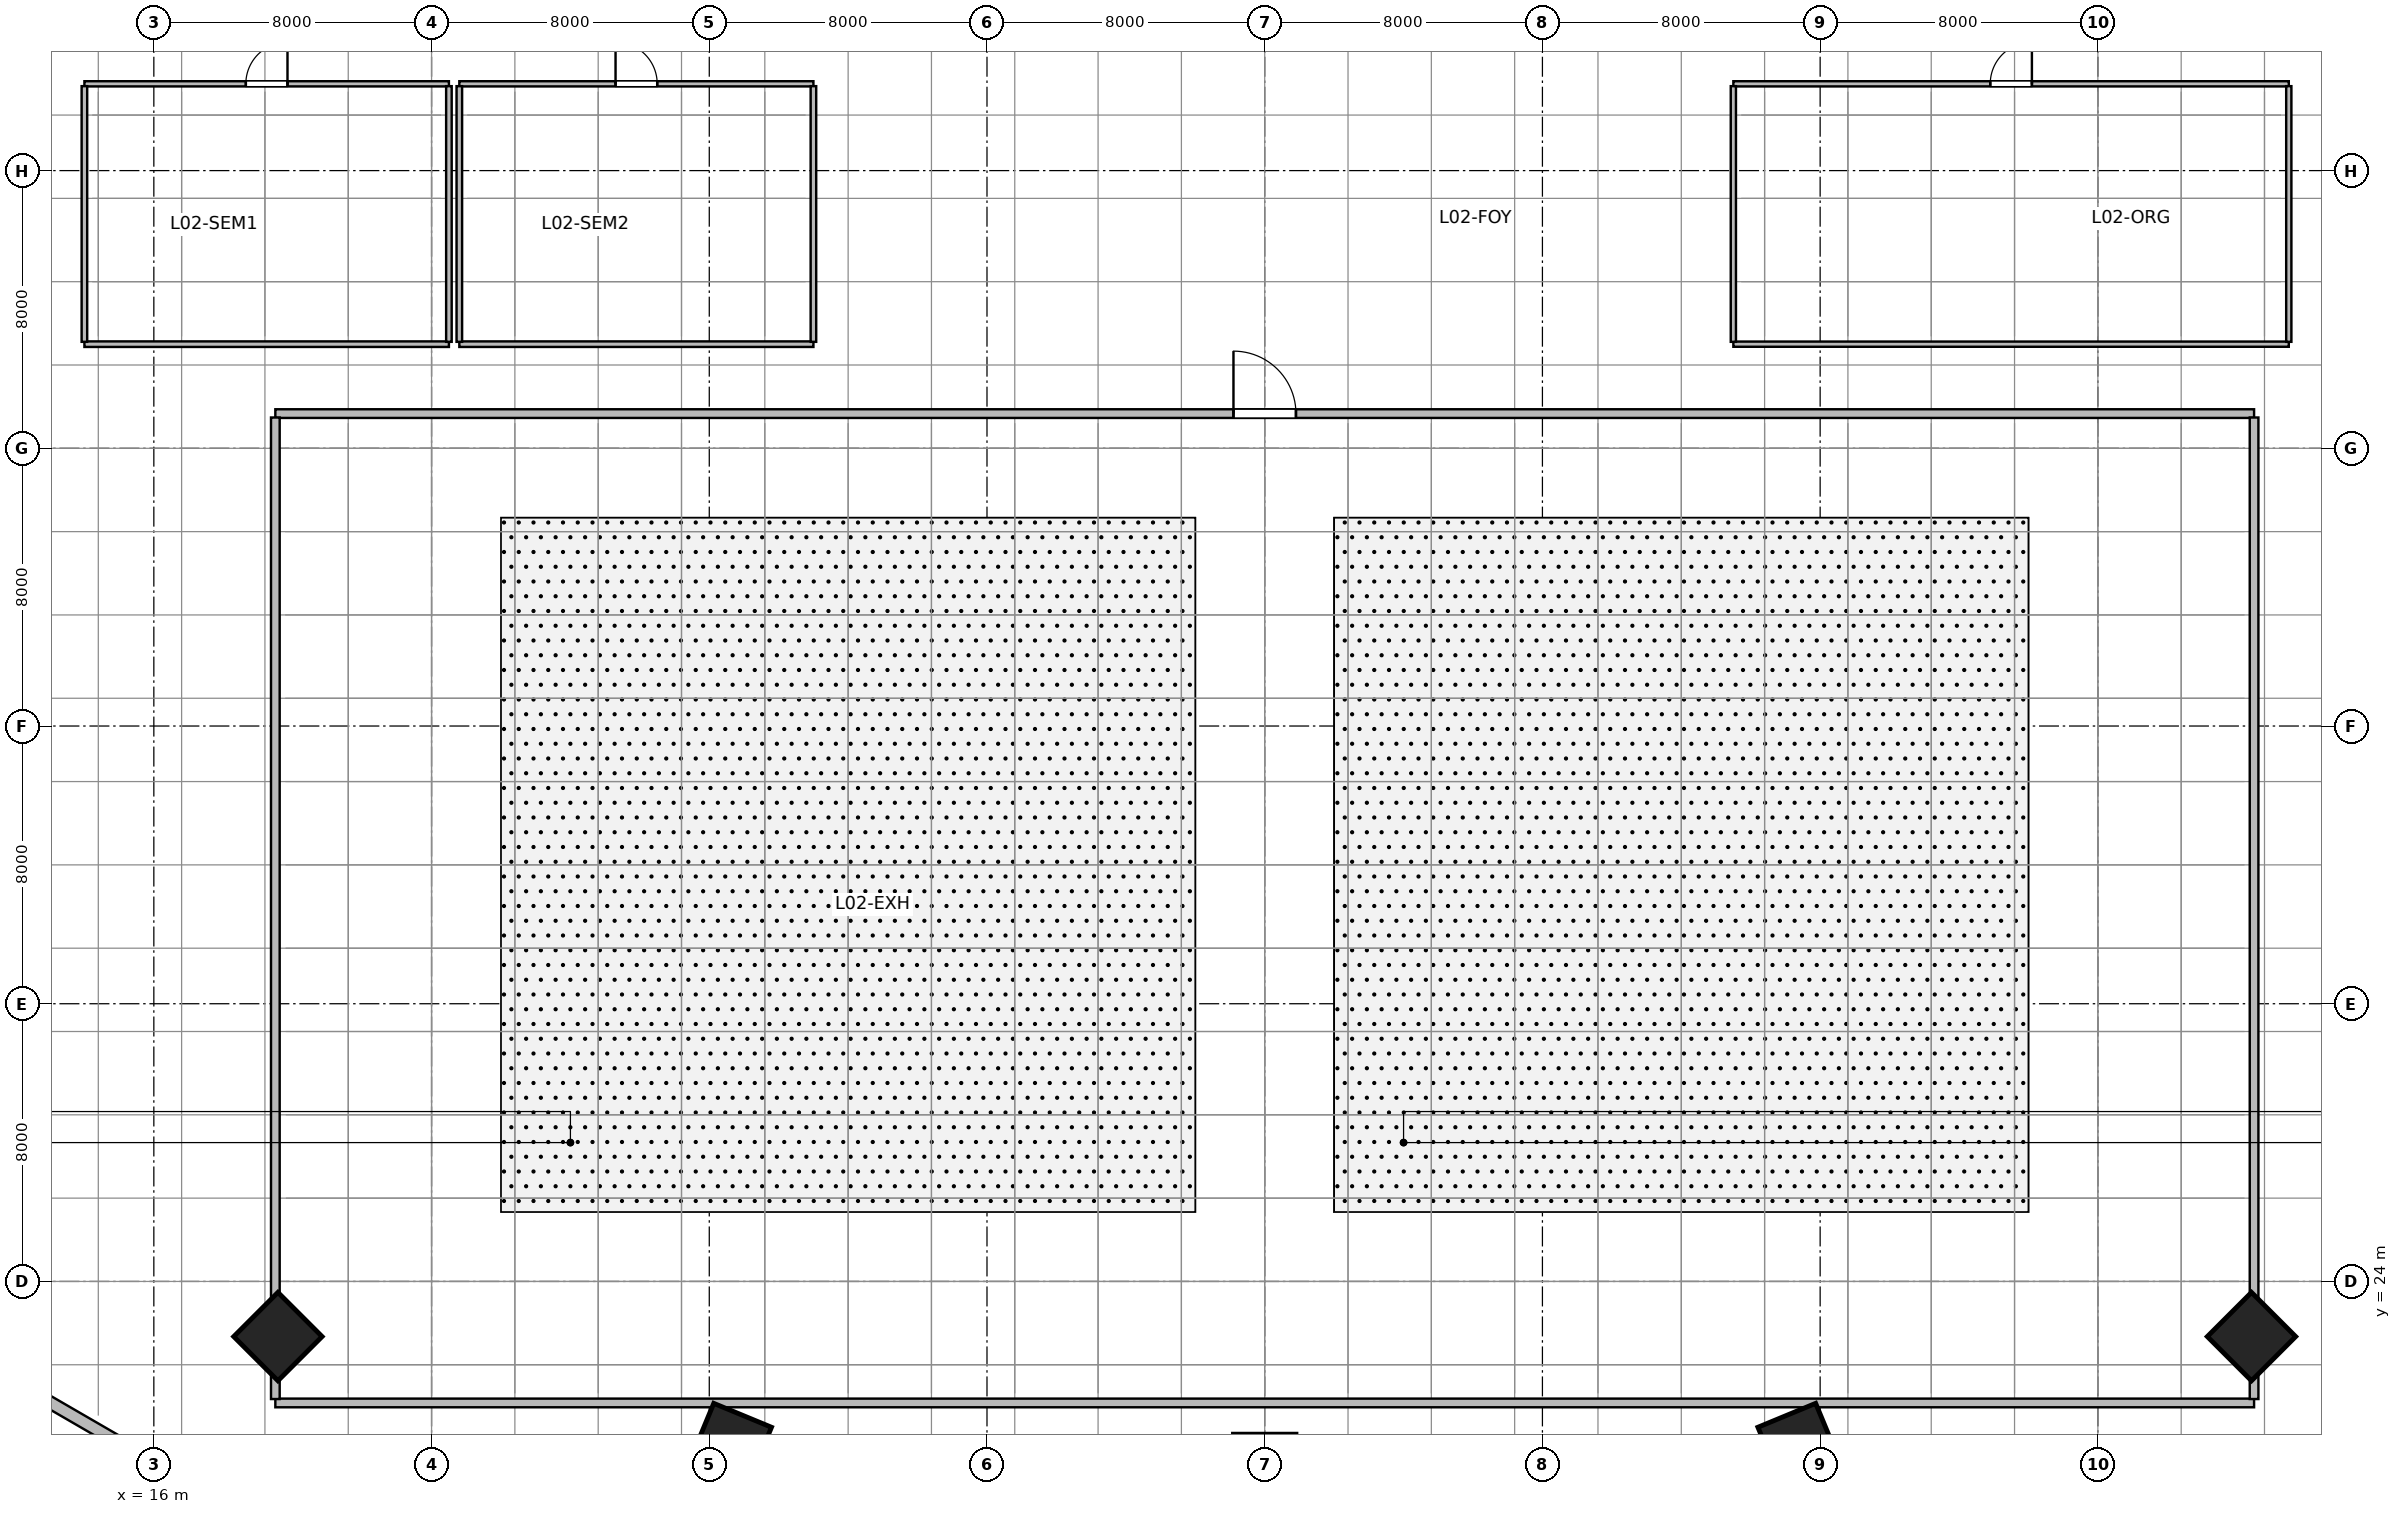
"""IFC4 building model, lengths in metres.
Left out: names, types, materials, properties, quantities, classifications, styles, units other than length and angle.
Written with IfcOpenShell. Run it as: python <this file> out.ifc"""

import sys

from ifc_helpers import new_model, si_unit, direction, frame, frame_2d, origin, origin_2d, place, context, subcontext, project, spatial, rectangle, extrude, source, transform, mapped, element, fill, save


model = new_model("IFC4")
c1 = context("Model", 3, precision=1e-05, world=origin(), true_north=direction((0.0, 1.0)))
c2 = subcontext(c1, "Body", "Model", "MODEL_VIEW")
j1 = project(units=[si_unit("LENGTHUNIT", "METRE"), si_unit("PLANEANGLEUNIT", "RADIAN")], contexts=[c1])
p1 = place(None, origin())
s1 = spatial("IfcSite", under=j1, at=p1, CompositionType="ELEMENT")
p2 = place(p1, origin())
s2 = spatial("IfcBuilding", under=s1, at=p2, CompositionType="ELEMENT")
p3 = place(p2, frame((0.0, 0.0, 12.0)))
s3 = spatial("IfcBuildingStorey", under=s2, at=p3, CompositionType="ELEMENT", Elevation=12.0)
m1 = source(origin(), c2, "Body", "SweptSolid", [
    extrude(rectangle(XDim=1.8, YDim=1.8, at=origin_2d()), origin(), (0.0, 0.0, 1.0), 6.0),
])
for number, where, z_axis, x_axis in (
    (1, (19.574, 22.412, 0.0), (0.0, 0.0, 1.0), (-0.707, -0.707, 0.0)),
    (2, (32.616, 19.312, 0.0), (0.0, 0.0, 1.0), (-0.383, -0.924, 0.0)),
    (3, (63.384, 19.312, 0.0), (0.0, 0.0, 1.0), (0.383, -0.924, 0.0)),
    (4, (76.426, 22.412, 0.0), (0.0, 0.0, 1.0), (0.707, -0.707, 0.0)),
):
    element("IfcColumn", number, at=place(p3, frame(where, z_axis=z_axis, x_axis=x_axis)), inside=s3, PredefinedType="COLUMN", context=c2, shape_type="MappedRepresentation", body=[
        mapped(m1, transform((0.0, 0.0, 0.0), scale=1.0)),
    ])
m2 = source(origin(), c2, "Body", "SweptSolid", [
    extrude(rectangle(XDim=4.535, YDim=0.35, at=frame_2d((2.268, 0.0))), origin(), (0.0, 0.0, 1.0), 5.7),
])
p4 = place(p3, frame((11.902, 21.154, 0.0), z_axis=(0.0, 0.0, 1.0), x_axis=(0.86528620064, -0.501278157295, 0.0)))
e5 = element("IfcWall", 5, at=p4, inside=s3, PredefinedType="SOLIDWALL", context=c2, shape_type="MappedRepresentation", body=[
    mapped(m2, transform((0.0, 0.0, 0.0), scale=1.0)),
])
m3 = source(origin(), c2, "Body", "SweptSolid", [
    extrude(rectangle(XDim=57.0, YDim=0.25, at=frame_2d((28.5, 0.0))), origin(), (0.0, 0.0, 1.0), 4.761),
])
p5 = place(p3, frame((19.5, 20.5, 0.0), z_axis=(0.0, 0.0, 1.0), x_axis=(1.0, 0.0, 0.0)))
e6 = element("IfcWall", 6, at=p5, inside=s3, PredefinedType="PARTITIONING", context=c2, shape_type="MappedRepresentation", body=[
    mapped(m3, transform((0.0, 0.0, 0.0), scale=1.0)),
])
m4 = source(origin(), c2, "Body", "SweptSolid", [
    extrude(rectangle(XDim=57.0, YDim=0.25, at=frame_2d((28.5, 0.0))), origin(), (0.0, 0.0, 1.0), 5.7),
])
p6 = place(p3, frame((19.5, 49.0, 0.0), z_axis=(0.0, 0.0, 1.0), x_axis=(1.0, 0.0, 0.0)))
e7 = element("IfcWall", 7, at=p6, inside=s3, PredefinedType="PARTITIONING", context=c2, shape_type="MappedRepresentation", body=[
    mapped(m4, transform((0.0, 0.0, 0.0), scale=1.0)),
])
p7 = place(p6, frame((27.6, 0.0, 0.0)))
e8 = element("IfcOpeningElement", 8, at=p7, cuts=e7, PredefinedType="OPENING", context=c2, shape_type="SweptSolid", body=[
    extrude(rectangle(XDim=1.8, YDim=2.15, at=frame_2d((0.9, 1.075))), frame((0.0, 0.135, 0.0), z_axis=(0.0, -1.0, 0.0), x_axis=(1.0, 0.0, 0.0)), (0.0, 0.0, 1.0), 0.27),
])
m5 = source(origin(), c2, "Body", "SweptSolid", [
    extrude(rectangle(XDim=28.275, YDim=0.25, at=frame_2d((14.137, 0.0))), origin(), (0.0, 0.0, 1.0), 5.7),
])
for number, where, z_axis, x_axis in (
    (9, (19.5, 20.613, 0.0), (0.0, 0.0, 1.0), (0.0, 1.0, 0.0)),
    (10, (76.5, 20.613, 0.0), (0.0, 0.0, 1.0), (0.0, 1.0, 0.0)),
):
    element("IfcWall", number, at=place(p3, frame(where, z_axis=z_axis, x_axis=x_axis)), inside=s3, PredefinedType="PARTITIONING", context=c2, shape_type="MappedRepresentation", body=[
        mapped(m5, transform((0.0, 0.0, 0.0), scale=1.0)),
    ])
m6 = source(origin(), c2, "Body", "SweptSolid", [
    extrude(rectangle(XDim=10.5, YDim=0.16, at=frame_2d((5.25, 0.0))), origin(), (0.0, 0.0, 1.0), 5.7),
])
p8 = place(p3, frame((14.0, 51.0, 0.0), z_axis=(0.0, 0.0, 1.0), x_axis=(1.0, 0.0, 0.0)))
e11 = element("IfcWall", 11, at=p8, inside=s3, PredefinedType="MOVABLE", context=c2, shape_type="MappedRepresentation", body=[
    mapped(m6, transform((0.0, 0.0, 0.0), scale=1.0)),
])
m7 = source(origin(), c2, "Body", "SweptSolid", [
    extrude(rectangle(XDim=10.5, YDim=0.15, at=frame_2d((5.25, 0.0))), origin(), (0.0, 0.0, 1.0), 5.7),
])
p9 = place(p3, frame((14.0, 58.5, 0.0), z_axis=(0.0, 0.0, 1.0), x_axis=(1.0, 0.0, 0.0)))
e12 = element("IfcWall", 12, at=p9, inside=s3, PredefinedType="PARTITIONING", context=c2, shape_type="MappedRepresentation", body=[
    mapped(m7, transform((0.0, 0.0, 0.0), scale=1.0)),
])
p10 = place(p9, frame((4.65, 0.0, 0.0)))
e13 = element("IfcOpeningElement", 13, at=p10, cuts=e12, PredefinedType="OPENING", context=c2, shape_type="SweptSolid", body=[
    extrude(rectangle(XDim=1.2, YDim=2.15, at=frame_2d((0.6, 1.075))), frame((0.0, 0.085, 0.0), z_axis=(0.0, -1.0, 0.0), x_axis=(1.0, 0.0, 0.0)), (0.0, 0.0, 1.0), 0.17),
])
m8 = source(origin(), c2, "Body", "SweptSolid", [
    extrude(rectangle(XDim=7.365, YDim=0.16, at=frame_2d((3.683, 0.0))), origin(), (0.0, 0.0, 1.0), 5.7),
])
for number, where, z_axis, x_axis in (
    (14, (14.0, 51.067, 0.0), (0.0, 0.0, 1.0), (0.0, 1.0, 0.0)),
    (15, (24.5, 51.067, 0.0), (0.0, 0.0, 1.0), (0.0, 1.0, 0.0)),
):
    element("IfcWall", number, at=place(p3, frame(where, z_axis=z_axis, x_axis=x_axis)), inside=s3, PredefinedType="MOVABLE", context=c2, shape_type="MappedRepresentation", body=[
        mapped(m8, transform((0.0, 0.0, 0.0), scale=1.0)),
    ])
m9 = source(origin(), c2, "Body", "SweptSolid", [
    extrude(rectangle(XDim=10.2, YDim=0.16, at=frame_2d((5.1, 0.0))), origin(), (0.0, 0.0, 1.0), 5.7),
])
p11 = place(p3, frame((24.8, 51.0, 0.0), z_axis=(0.0, 0.0, 1.0), x_axis=(1.0, 0.0, 0.0)))
e16 = element("IfcWall", 16, at=p11, inside=s3, PredefinedType="MOVABLE", context=c2, shape_type="MappedRepresentation", body=[
    mapped(m9, transform((0.0, 0.0, 0.0), scale=1.0)),
])
m10 = source(origin(), c2, "Body", "SweptSolid", [
    extrude(rectangle(XDim=10.2, YDim=0.15, at=frame_2d((5.1, 0.0))), origin(), (0.0, 0.0, 1.0), 4.834),
])
p12 = place(p3, frame((24.8, 58.5, 0.0), z_axis=(0.0, 0.0, 1.0), x_axis=(1.0, 0.0, 0.0)))
e17 = element("IfcWall", 17, at=p12, inside=s3, PredefinedType="PARTITIONING", context=c2, shape_type="MappedRepresentation", body=[
    mapped(m10, transform((0.0, 0.0, 0.0), scale=1.0)),
])
p13 = place(p12, frame((4.5, 0.0, 0.0)))
e18 = element("IfcOpeningElement", 18, at=p13, cuts=e17, PredefinedType="OPENING", context=c2, shape_type="SweptSolid", body=[
    extrude(rectangle(XDim=1.2, YDim=2.15, at=frame_2d((0.6, 1.075))), frame((0.0, 0.085, 0.0), z_axis=(0.0, -1.0, 0.0), x_axis=(1.0, 0.0, 0.0)), (0.0, 0.0, 1.0), 0.17),
])
p14 = place(p3, frame((24.8, 51.067, 0.0), z_axis=(0.0, 0.0, 1.0), x_axis=(0.0, 1.0, 0.0)))
e19 = element("IfcWall", 19, at=p14, inside=s3, PredefinedType="MOVABLE", context=c2, shape_type="MappedRepresentation", body=[
    mapped(m8, transform((0.0, 0.0, 0.0), scale=1.0)),
])
m11 = source(origin(), c2, "Body", "SweptSolid", [
    extrude(rectangle(XDim=7.365, YDim=0.16, at=frame_2d((3.683, 0.0))), origin(), (0.0, 0.0, 1.0), 4.834),
])
p15 = place(p3, frame((35.0, 51.067, 0.0), z_axis=(0.0, 0.0, 1.0), x_axis=(0.0, 1.0, 0.0)))
e20 = element("IfcWall", 20, at=p15, inside=s3, PredefinedType="MOVABLE", context=c2, shape_type="MappedRepresentation", body=[
    mapped(m11, transform((0.0, 0.0, 0.0), scale=1.0)),
])
m12 = source(origin(), c2, "Body", "SweptSolid", [
    extrude(rectangle(XDim=16.0, YDim=0.15, at=frame_2d((8.0, 0.0))), origin(), (0.0, 0.0, 1.0), 5.7),
])
p16 = place(p3, frame((61.5, 51.0, 0.0), z_axis=(0.0, 0.0, 1.0), x_axis=(1.0, 0.0, 0.0)))
e21 = element("IfcWall", 21, at=p16, inside=s3, PredefinedType="PARTITIONING", context=c2, shape_type="MappedRepresentation", body=[
    mapped(m12, transform((0.0, 0.0, 0.0), scale=1.0)),
])
m13 = source(origin(), c2, "Body", "SweptSolid", [
    extrude(rectangle(XDim=16.0, YDim=0.15, at=frame_2d((8.0, 0.0))), origin(), (0.0, 0.0, 1.0), 4.834),
])
p17 = place(p3, frame((61.5, 58.5, 0.0), z_axis=(0.0, 0.0, 1.0), x_axis=(1.0, 0.0, 0.0)))
e22 = element("IfcWall", 22, at=p17, inside=s3, PredefinedType="PARTITIONING", context=c2, shape_type="MappedRepresentation", body=[
    mapped(m13, transform((0.0, 0.0, 0.0), scale=1.0)),
])
p18 = place(p17, frame((7.4, 0.0, 0.0)))
e23 = element("IfcOpeningElement", 23, at=p18, cuts=e22, PredefinedType="OPENING", context=c2, shape_type="SweptSolid", body=[
    extrude(rectangle(XDim=1.2, YDim=2.15, at=frame_2d((0.6, 1.075))), frame((0.0, 0.085, 0.0), z_axis=(0.0, -1.0, 0.0), x_axis=(1.0, 0.0, 0.0)), (0.0, 0.0, 1.0), 0.17),
])
m14 = source(origin(), c2, "Body", "SweptSolid", [
    extrude(rectangle(XDim=7.365, YDim=0.15, at=frame_2d((3.683, 0.0))), origin(), (0.0, 0.0, 1.0), 4.834),
])
p19 = place(p3, frame((61.5, 51.067, 0.0), z_axis=(0.0, 0.0, 1.0), x_axis=(0.0, 1.0, 0.0)))
e24 = element("IfcWall", 24, at=p19, inside=s3, PredefinedType="PARTITIONING", context=c2, shape_type="MappedRepresentation", body=[
    mapped(m14, transform((0.0, 0.0, 0.0), scale=1.0)),
])
m15 = source(origin(), c2, "Body", "SweptSolid", [
    extrude(rectangle(XDim=7.365, YDim=0.15, at=frame_2d((3.683, 0.0))), origin(), (0.0, 0.0, 1.0), 5.7),
])
p20 = place(p3, frame((77.5, 51.067, 0.0), z_axis=(0.0, 0.0, 1.0), x_axis=(0.0, 1.0, 0.0)))
e25 = element("IfcWall", 25, at=p20, inside=s3, PredefinedType="PARTITIONING", context=c2, shape_type="MappedRepresentation", body=[
    mapped(m15, transform((0.0, 0.0, 0.0), scale=1.0)),
])
m16 = source(origin(), c2, "Body", "SweptSolid", [
    extrude(rectangle(XDim=1.8, YDim=2.15, at=frame_2d((0.9, 1.075))), frame((0.0, 0.025, 0.0), z_axis=(0.0, -1.0, 0.0), x_axis=(1.0, 0.0, 0.0)), (0.0, 0.0, 1.0), 0.05),
])
p21 = place(p7, origin())
e26 = element("IfcDoor", 26, at=p21, inside=s3, OperationType="SINGLE_SWING_LEFT", PredefinedType="DOOR", context=c2, shape_type="MappedRepresentation", body=[
    mapped(m16, transform((0.0, 0.0, 0.0), scale=1.0)),
])
fill(e8, e26)
m17 = source(origin(), c2, "Body", "SweptSolid", [
    extrude(rectangle(XDim=1.2, YDim=2.15, at=frame_2d((0.6, 1.075))), frame((0.0, 0.025, 0.0), z_axis=(0.0, -1.0, 0.0), x_axis=(1.0, 0.0, 0.0)), (0.0, 0.0, 1.0), 0.05),
])
p22 = place(p10, origin())
e27 = element("IfcDoor", 27, at=p22, inside=s3, OperationType="SINGLE_SWING_RIGHT", PredefinedType="DOOR", context=c2, shape_type="MappedRepresentation", body=[
    mapped(m17, transform((0.0, 0.0, 0.0), scale=1.0)),
])
fill(e13, e27)
p23 = place(p13, origin())
e28 = element("IfcDoor", 28, at=p23, inside=s3, OperationType="SINGLE_SWING_LEFT", PredefinedType="DOOR", context=c2, shape_type="MappedRepresentation", body=[
    mapped(m17, transform((0.0, 0.0, 0.0), scale=1.0)),
])
fill(e18, e28)
p24 = place(p18, origin())
e29 = element("IfcDoor", 29, at=p24, inside=s3, OperationType="SINGLE_SWING_RIGHT", PredefinedType="DOOR", context=c2, shape_type="MappedRepresentation", body=[
    mapped(m17, transform((0.0, 0.0, 0.0), scale=1.0)),
])
fill(e23, e29)
save(model, sys.argv[1])
